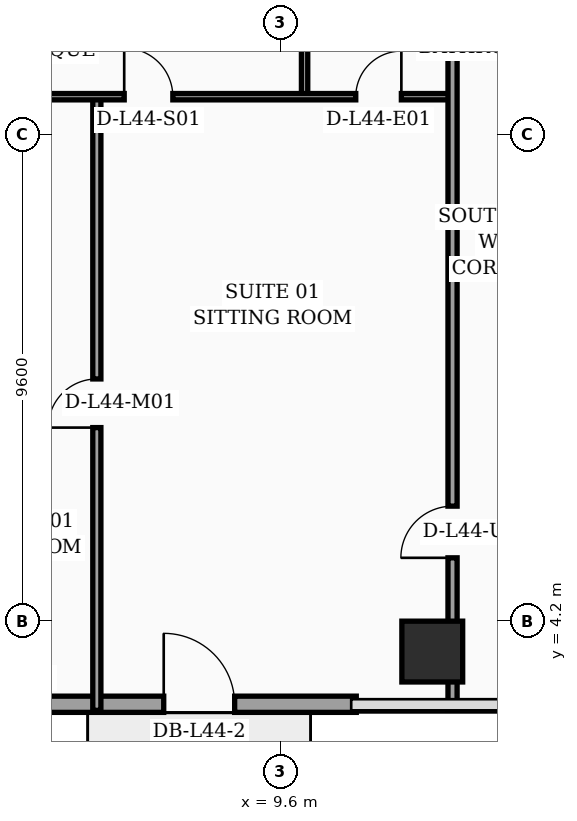
"""IFC4 building model, lengths in metres.
Left out: names, types, materials, properties, quantities, classifications, styles, units other than length and angle.
Written with IfcOpenShell. Run it as: python <this file> out.ifc"""

import sys

from ifc_helpers import new_model, si_unit, direction, frame, frame_2d, origin, origin_2d, place, context, subcontext, project, spatial, rectangle, extrude, element, fill, save


model = new_model("IFC4")
c1 = context("Model", 3, precision=1e-05, world=origin(), true_north=direction((0.0, 1.0)))
c2 = subcontext(c1, "Body", "Model", "MODEL_VIEW")
j1 = project(units=[si_unit("LENGTHUNIT", "METRE"), si_unit("PLANEANGLEUNIT", "RADIAN")], contexts=[c1])
p1 = place(None, origin())
s1 = spatial("IfcSite", under=j1, at=p1, CompositionType="ELEMENT")
p2 = place(p1, origin())
s2 = spatial("IfcBuilding", under=s1, at=p2, CompositionType="ELEMENT")
p3 = place(p2, frame((0.0, 0.0, 178.9)))
s3 = spatial("IfcBuildingStorey", under=s2, at=p3, CompositionType="ELEMENT", Elevation=178.9)
p4 = place(p3, frame((12.6, 3.6, 0.0), z_axis=(0.0, 0.0, 1.0), x_axis=(1.0, 0.0, 0.0)))
e1 = element("IfcColumn", 1, at=p4, inside=s3, PredefinedType="COLUMN", context=c2, shape_type="SweptSolid", body=[
    extrude(rectangle(XDim=1.2, YDim=1.2, at=origin_2d()), origin(), (0.0, 0.0, 1.0), 3.56),
])
p5 = place(p3, frame((3.1, 2.56, 0.0), z_axis=(0.0, 0.0, 1.0), x_axis=(1.0, 0.0, 0.0)))
e2 = element("IfcWall", 2, at=p5, inside=s3, PredefinedType="SOLIDWALL", context=c2, shape_type="SweptSolid", body=[
    extrude(rectangle(XDim=8.0, YDim=0.32, at=frame_2d((4.0, 0.0))), origin(), (0.0, 0.0, 1.0), 3.56),
])
p6 = place(p5, frame((0.45, 0.0, 0.75)))
e3 = element("IfcOpeningElement", 3, at=p6, cuts=e2, PredefinedType="OPENING", context=c2, shape_type="SweptSolid", body=[
    extrude(rectangle(XDim=1.0, YDim=1.6, at=frame_2d((0.5, 0.8))), frame((0.0, 0.17, 0.0), z_axis=(0.0, -1.0, 0.0), x_axis=(1.0, 0.0, 0.0)), (0.0, 0.0, 1.0), 0.34),
])
p7 = place(p5, frame((4.2, 0.0, 0.0)))
e4 = element("IfcOpeningElement", 4, at=p7, cuts=e2, PredefinedType="OPENING", context=c2, shape_type="SweptSolid", body=[
    extrude(rectangle(XDim=1.4, YDim=2.25, at=frame_2d((0.7, 1.125))), frame((0.0, 0.17, 0.0), z_axis=(0.0, -1.0, 0.0), x_axis=(1.0, 0.0, 0.0)), (0.0, 0.0, 1.0), 0.34),
])
p8 = place(p3, frame((10.08, 14.55, 0.0), z_axis=(0.0, 0.0, 1.0), x_axis=(0.0, 1.0, 0.0)))
e5 = element("IfcWall", 5, at=p8, inside=s3, PredefinedType="PARTITIONING", context=c2, shape_type="SweptSolid", body=[
    extrude(rectangle(XDim=2.25, YDim=0.125, at=frame_2d((1.125, 0.0))), origin(), (0.0, 0.0, 1.0), 3.56),
])
p9 = place(p3, frame((5.98, 2.44, 0.0), z_axis=(0.0, 0.0, 1.0), x_axis=(0.0, 1.0, 0.0)))
e6 = element("IfcWall", 6, at=p9, inside=s3, PredefinedType="PARTITIONING", context=c2, shape_type="SweptSolid", body=[
    extrude(rectangle(XDim=12.11, YDim=0.16, at=frame_2d((6.055, 0.0))), origin(), (0.0, 0.0, 1.0), 3.04),
])
p10 = place(p9, frame((5.58, 0.0, 0.0)))
e7 = element("IfcOpeningElement", 7, at=p10, cuts=e6, PredefinedType="OPENING", context=c2, shape_type="SweptSolid", body=[
    extrude(rectangle(XDim=0.96, YDim=2.2, at=frame_2d((0.48, 1.1))), frame((0.0, 0.09, 0.0), z_axis=(0.0, -1.0, 0.0), x_axis=(1.0, 0.0, 0.0)), (0.0, 0.0, 1.0), 0.18),
])
p11 = place(p3, frame((3.2, 14.55, 0.0), z_axis=(0.0, 0.0, 1.0), x_axis=(1.0, 0.0, 0.0)))
e8 = element("IfcWall", 8, at=p11, inside=s3, PredefinedType="PARTITIONING", context=c2, shape_type="SweptSolid", body=[
    extrude(rectangle(XDim=9.8, YDim=0.125, at=frame_2d((4.9, 0.0))), origin(), (0.0, 0.0, 1.0), 2.94),
])
p12 = place(p11, frame((3.32, 0.0, 0.0)))
e9 = element("IfcOpeningElement", 9, at=p12, cuts=e8, PredefinedType="OPENING", context=c2, shape_type="SweptSolid", body=[
    extrude(rectangle(XDim=0.96, YDim=2.2, at=frame_2d((0.48, 1.1))), frame((0.0, 0.073, 0.0), z_axis=(0.0, -1.0, 0.0), x_axis=(1.0, 0.0, 0.0)), (0.0, 0.0, 1.0), 0.145),
])
p13 = place(p11, frame((7.89, 0.0, 0.0)))
e10 = element("IfcOpeningElement", 10, at=p13, cuts=e8, PredefinedType="OPENING", context=c2, shape_type="SweptSolid", body=[
    extrude(rectangle(XDim=0.9, YDim=2.15, at=frame_2d((0.45, 1.075))), frame((0.0, 0.073, 0.0), z_axis=(0.0, -1.0, 0.0), x_axis=(1.0, 0.0, 0.0)), (0.0, 0.0, 1.0), 0.145),
])
p14 = place(p3, frame((13.0, 2.44, 0.0), z_axis=(0.0, 0.0, 1.0), x_axis=(0.0, 1.0, 0.0)))
e11 = element("IfcWall", 11, at=p14, inside=s3, PredefinedType="PARTITIONING", context=c2, shape_type="SweptSolid", body=[
    extrude(rectangle(XDim=14.36, YDim=0.18, at=frame_2d((7.18, 0.0))), origin(), (0.0, 0.0, 1.0), 2.94),
])
p15 = place(p14, frame((3.01, 0.0, 0.0)))
e12 = element("IfcOpeningElement", 12, at=p15, cuts=e11, PredefinedType="OPENING", context=c2, shape_type="SweptSolid", body=[
    extrude(rectangle(XDim=1.02, YDim=2.2, at=frame_2d((0.51, 1.1))), frame((0.0, 0.1, 0.0), z_axis=(0.0, -1.0, 0.0), x_axis=(1.0, 0.0, 0.0)), (0.0, 0.0, 1.0), 0.2),
])
p16 = place(p7, origin())
e13 = element("IfcDoor", 13, at=p16, inside=s3, OperationType="SINGLE_SWING_LEFT", PredefinedType="DOOR", context=c2, shape_type="SweptSolid", body=[
    extrude(rectangle(XDim=1.4, YDim=2.25, at=frame_2d((0.7, 1.125))), frame((0.0, 0.025, 0.0), z_axis=(0.0, -1.0, 0.0), x_axis=(1.0, 0.0, 0.0)), (0.0, 0.0, 1.0), 0.05),
])
fill(e4, e13)
p17 = place(p10, origin())
e14 = element("IfcDoor", 14, at=p17, inside=s3, OperationType="SINGLE_SWING_LEFT", PredefinedType="DOOR", context=c2, shape_type="SweptSolid", body=[
    extrude(rectangle(XDim=0.96, YDim=2.2, at=frame_2d((0.48, 1.1))), frame((0.0, 0.025, 0.0), z_axis=(0.0, -1.0, 0.0), x_axis=(1.0, 0.0, 0.0)), (0.0, 0.0, 1.0), 0.05),
])
fill(e7, e14)
p18 = place(p12, origin())
e15 = element("IfcDoor", 15, at=p18, inside=s3, OperationType="SINGLE_SWING_LEFT", PredefinedType="DOOR", context=c2, shape_type="SweptSolid", body=[
    extrude(rectangle(XDim=0.96, YDim=2.2, at=frame_2d((0.48, 1.1))), frame((0.0, 0.025, 0.0), z_axis=(0.0, -1.0, 0.0), x_axis=(1.0, 0.0, 0.0)), (0.0, 0.0, 1.0), 0.05),
])
fill(e9, e15)
p19 = place(p13, origin())
e16 = element("IfcDoor", 16, at=p19, inside=s3, OperationType="SINGLE_SWING_RIGHT", PredefinedType="DOOR", context=c2, shape_type="SweptSolid", body=[
    extrude(rectangle(XDim=0.9, YDim=2.15, at=frame_2d((0.45, 1.075))), frame((0.0, 0.025, 0.0), z_axis=(0.0, -1.0, 0.0), x_axis=(1.0, 0.0, 0.0)), (0.0, 0.0, 1.0), 0.05),
])
fill(e10, e16)
p20 = place(p15, origin())
e17 = element("IfcDoor", 17, at=p20, inside=s3, OperationType="SINGLE_SWING_LEFT", PredefinedType="DOOR", context=c2, shape_type="SweptSolid", body=[
    extrude(rectangle(XDim=1.02, YDim=2.2, at=frame_2d((0.51, 1.1))), frame((0.0, 0.025, 0.0), z_axis=(0.0, -1.0, 0.0), x_axis=(1.0, 0.0, 0.0)), (0.0, 0.0, 1.0), 0.05),
])
fill(e12, e17)
save(model, sys.argv[1])
